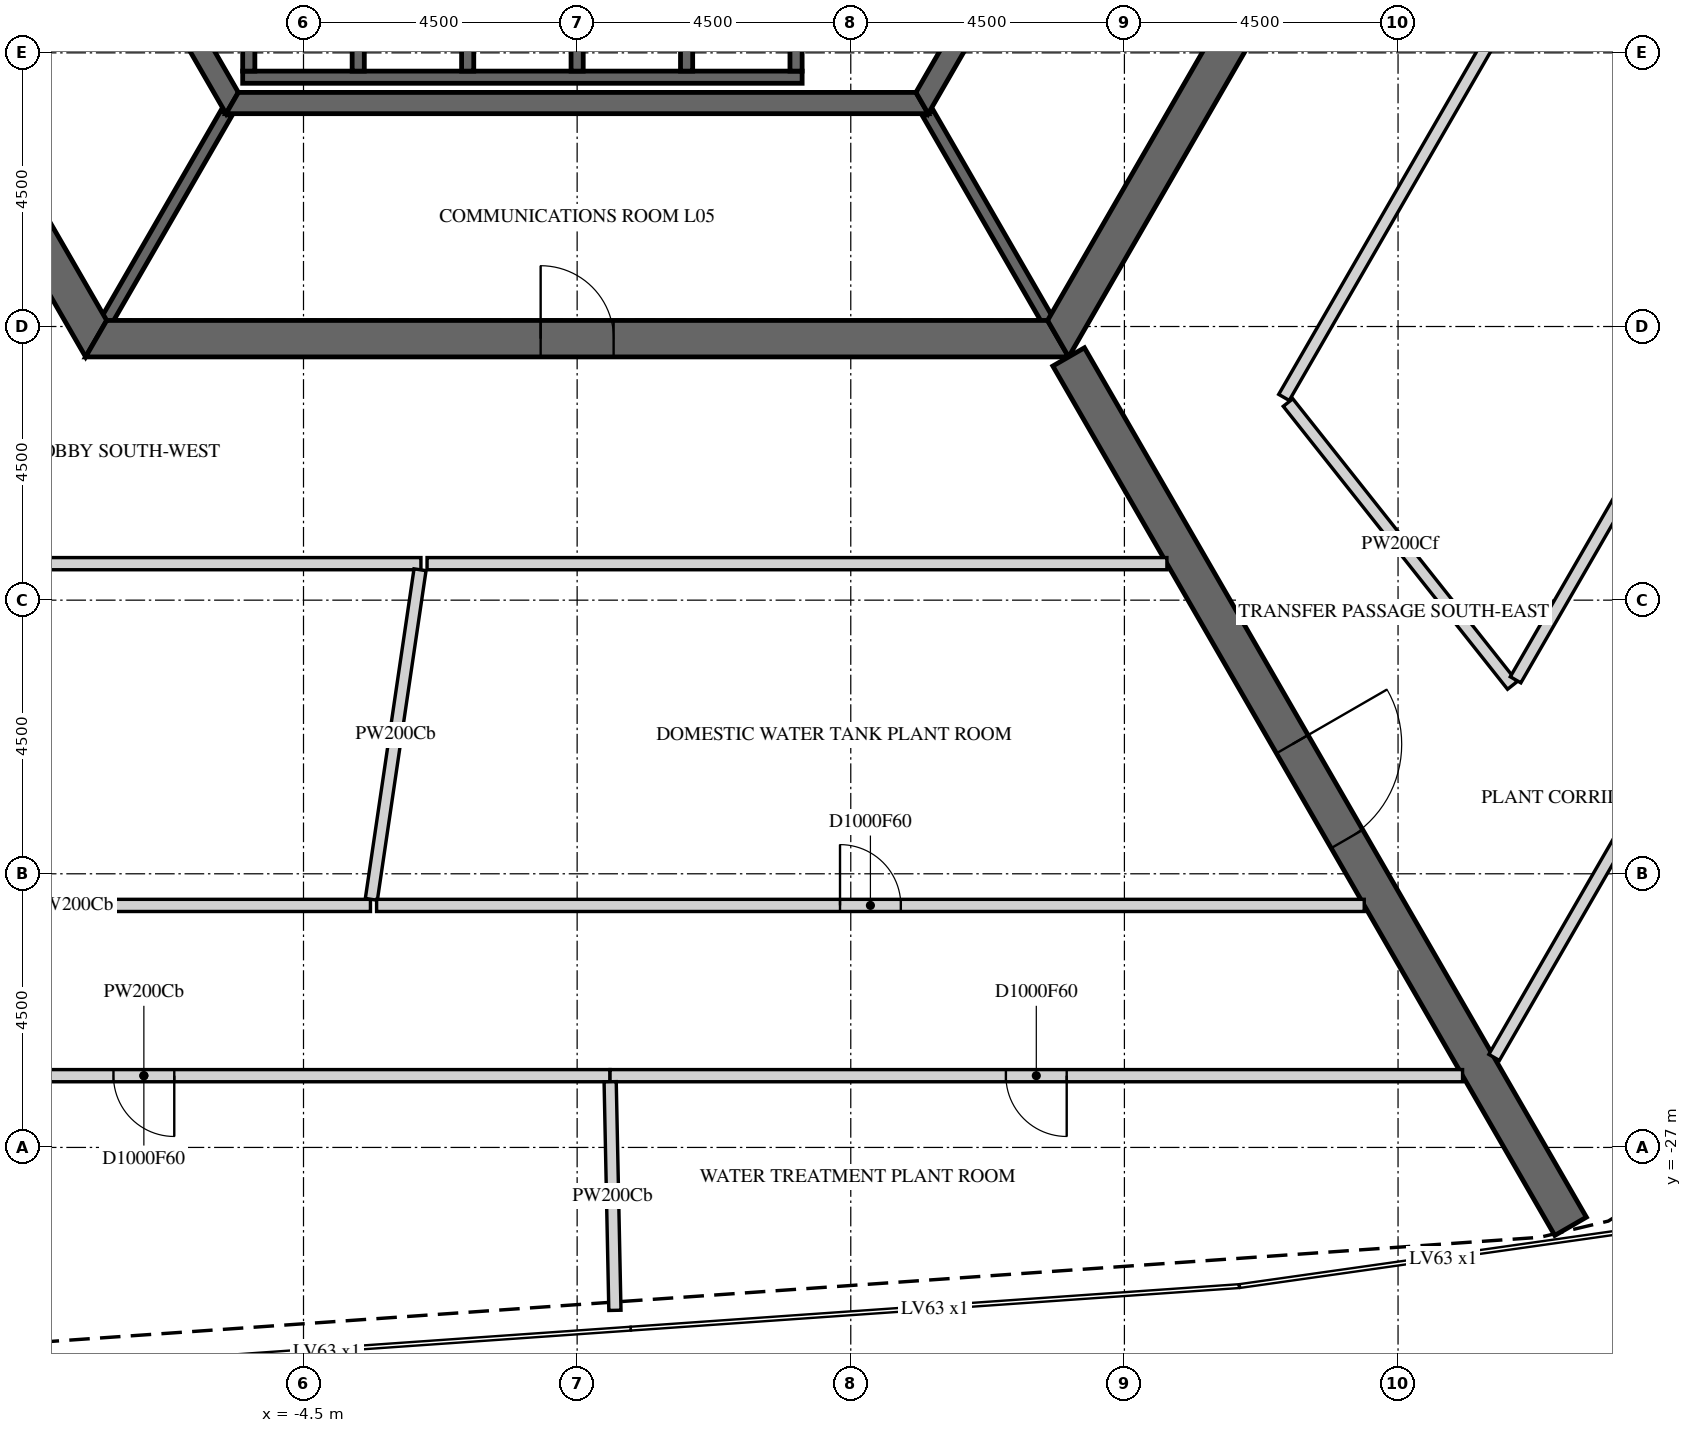
"""IFC4 building model, lengths in metres.
Left out: names, types, materials, properties, quantities, classifications, styles, units other than length and angle.
Written with IfcOpenShell. Run it as: python <this file> out.ifc"""

import sys

from ifc_helpers import new_model, si_unit, direction, frame, frame_2d, origin, place, context, subcontext, project, spatial, polyline, rectangle, outline, extrude, element, fill, save


model = new_model("IFC4")
c1 = context("Model", 3, precision=1e-05, world=origin(), true_north=direction((0.0, 1.0)))
c2 = subcontext(c1, "Body", "Model", "MODEL_VIEW")
j1 = project(units=[si_unit("LENGTHUNIT", "METRE"), si_unit("PLANEANGLEUNIT", "RADIAN")], contexts=[c1])
p1 = place(None, origin())
s1 = spatial("IfcSite", under=j1, at=p1, CompositionType="ELEMENT")
p2 = place(p1, origin())
s2 = spatial("IfcBuilding", under=s1, at=p2, CompositionType="ELEMENT")
p3 = place(p2, frame((0.0, 0.0, 31.5)))
s3 = spatial("IfcBuildingStorey", under=s2, at=p3, CompositionType="ELEMENT", Elevation=31.5)
p4 = place(p3, frame((-15.819, 0.0, -0.3), z_axis=(0.0, 0.0, 1.0), x_axis=(0.499999880136, -0.866025472988, 0.0)))
e1 = element("IfcWall", 1, at=p4, inside=s3, PredefinedType="SHEAR", context=c2, shape_type="SweptSolid", body=[
    extrude(outline(polyline([(-0.173, -0.3), (15.993, -0.3), (15.646, 0.3), (0.173, 0.3), (-0.173, -0.3)])), origin(), (0.0, 0.0, 1.0), 6.15),
])
p5 = place(p4, frame((6.981, 0.0, 0.3)))
e2 = element("IfcOpeningElement", 2, at=p5, cuts=e1, PredefinedType="OPENING", context=c2, shape_type="SweptSolid", body=[
    extrude(rectangle(XDim=1.8, YDim=2.4, at=frame_2d((0.9, 1.2))), frame((0.0, 0.31, 0.0), z_axis=(0.0, -1.0, 0.0), x_axis=(1.0, 0.0, 0.0)), (0.0, 0.0, 1.0), 0.62),
])
p6 = place(p3, frame((-7.91, -13.7, -0.3), z_axis=(0.0, 0.0, 1.0), x_axis=(1.0, 0.0, 0.0)))
e3 = element("IfcWall", 3, at=p6, inside=s3, PredefinedType="SHEAR", context=c2, shape_type="SweptSolid", body=[
    extrude(outline(polyline([(-0.173, -0.3), (15.993, -0.3), (15.646, 0.3), (0.173, 0.3), (-0.173, -0.3)])), origin(), (0.0, 0.0, 1.0), 6.15),
])
p7 = place(p6, frame((7.31, 0.0, 0.3)))
e4 = element("IfcOpeningElement", 4, at=p7, cuts=e3, PredefinedType="OPENING", context=c2, shape_type="SweptSolid", body=[
    extrude(rectangle(XDim=1.2, YDim=2.4, at=frame_2d((0.6, 1.2))), frame((0.0, 0.31, 0.0), z_axis=(0.0, -1.0, 0.0), x_axis=(1.0, 0.0, 0.0)), (0.0, 0.0, 1.0), 0.62),
])
p8 = place(p3, frame((7.91, -13.7, -0.3), z_axis=(0.0, 0.0, 1.0), x_axis=(0.499999880136, 0.866025472988, 0.0)))
e5 = element("IfcWall", 5, at=p8, inside=s3, PredefinedType="SHEAR", context=c2, shape_type="SweptSolid", body=[
    extrude(outline(polyline([(-0.173, -0.3), (15.993, -0.3), (15.646, 0.3), (0.173, 0.3), (-0.173, -0.3)])), origin(), (0.0, 0.0, 1.0), 6.15),
])
p9 = place(p8, frame((7.039, 0.0, 0.3)))
e6 = element("IfcOpeningElement", 6, at=p9, cuts=e5, PredefinedType="OPENING", context=c2, shape_type="SweptSolid", body=[
    extrude(rectangle(XDim=1.8, YDim=2.4, at=frame_2d((0.9, 1.2))), frame((0.0, 0.31, 0.0), z_axis=(0.0, -1.0, 0.0), x_axis=(1.0, 0.0, 0.0)), (0.0, 0.0, 1.0), 0.62),
])
p10 = place(p3, frame((8.083, -14.0, -0.3), z_axis=(0.0, 0.0, 1.0), x_axis=(0.499997680643, -0.866026742862, 0.0)))
e7 = element("IfcWall", 7, at=p10, inside=s3, PredefinedType="SHEAR", context=c2, shape_type="SweptSolid", body=[
    extrude(rectangle(XDim=16.509, YDim=0.6, at=frame_2d((8.254, 0.0))), origin(), (0.0, 0.0, 1.0), 6.15),
])
p11 = place(p10, frame((7.354, 0.0, 0.3)))
e8 = element("IfcOpeningElement", 8, at=p11, cuts=e7, PredefinedType="OPENING", context=c2, shape_type="SweptSolid", body=[
    extrude(rectangle(XDim=1.8, YDim=2.4, at=frame_2d((0.9, 1.2))), frame((0.0, 0.31, 0.0), z_axis=(0.0, -1.0, 0.0), x_axis=(1.0, 0.0, 0.0)), (0.0, 0.0, 1.0), 0.62),
])
p12 = place(p3, frame((-11.345, 0.0, -0.3), z_axis=(0.0, 0.0, 1.0), x_axis=(0.499995046907, -0.866028263435, 0.0)))
e9 = element("IfcWall", 9, at=p12, inside=s3, PredefinedType="SHEAR", context=c2, shape_type="SweptSolid", body=[
    extrude(outline(polyline([(-0.101, -0.175), (11.446, -0.175), (11.244, 0.175), (0.101, 0.175), (-0.101, -0.175)])), origin(), (0.0, 0.0, 1.0), 6.15),
])
p13 = place(p12, frame((4.744, 0.0, 0.3)))
e10 = element("IfcOpeningElement", 10, at=p13, cuts=e9, PredefinedType="OPENING", context=c2, shape_type="SweptSolid", body=[
    extrude(rectangle(XDim=1.8, YDim=2.4, at=frame_2d((0.9, 1.2))), frame((0.0, 0.185, 0.0), z_axis=(0.0, -1.0, 0.0), x_axis=(1.0, 0.0, 0.0)), (0.0, 0.0, 1.0), 0.37),
])
p14 = place(p3, frame((-5.673, -9.825, -0.3), z_axis=(0.0, 0.0, 1.0), x_axis=(1.0, 0.0, 0.0)))
e11 = element("IfcWall", 11, at=p14, inside=s3, PredefinedType="SHEAR", context=c2, shape_type="SweptSolid", body=[
    extrude(outline(polyline([(-0.101, -0.175), (11.446, -0.175), (11.244, 0.175), (0.101, 0.175), (-0.101, -0.175)])), origin(), (0.0, 0.0, 1.0), 6.15),
])
p15 = place(p3, frame((5.673, -9.825, -0.3), z_axis=(0.0, 0.0, 1.0), x_axis=(0.499995046907, 0.866028263435, 0.0)))
e12 = element("IfcWall", 12, at=p15, inside=s3, PredefinedType="SHEAR", context=c2, shape_type="SweptSolid", body=[
    extrude(outline(polyline([(-0.101, -0.175), (11.446, -0.175), (11.244, 0.175), (0.101, 0.175), (-0.101, -0.175)])), origin(), (0.0, 0.0, 1.0), 6.15),
])
p16 = place(p15, frame((4.801, 0.0, 0.3)))
e13 = element("IfcOpeningElement", 13, at=p16, cuts=e12, PredefinedType="OPENING", context=c2, shape_type="SweptSolid", body=[
    extrude(rectangle(XDim=1.8, YDim=2.4, at=frame_2d((0.9, 1.2))), frame((0.0, 0.185, 0.0), z_axis=(0.0, -1.0, 0.0), x_axis=(1.0, 0.0, 0.0)), (0.0, 0.0, 1.0), 0.37),
])
p17 = place(p3, frame((-5.5, -9.4, -0.25), z_axis=(0.0, 0.0, 1.0), x_axis=(1.0, 0.0, 0.0)))
e14 = element("IfcWall", 14, at=p17, inside=s3, PredefinedType="SHEAR", context=c2, shape_type="SweptSolid", body=[
    extrude(rectangle(XDim=9.2, YDim=0.2, at=frame_2d((4.6, 0.0))), origin(), (0.0, 0.0, 1.0), 6.0),
])
for number, where, z_axis, x_axis in (
    (15, (-5.4, -9.3, -0.25), (0.0, 0.0, 1.0), (0.0, 1.0, 0.0)),
    (16, (-3.6, -9.3, -0.25), (0.0, 0.0, 1.0), (0.0, 1.0, 0.0)),
    (17, (-1.8, -9.3, -0.25), (0.0, 0.0, 1.0), (0.0, 1.0, 0.0)),
    (18, (0.0, -9.3, -0.25), (0.0, 0.0, 1.0), (0.0, 1.0, 0.0)),
    (19, (1.8, -9.3, -0.25), (0.0, 0.0, 1.0), (0.0, 1.0, 0.0)),
    (20, (3.6, -9.3, -0.25), (0.0, 0.0, 1.0), (0.0, 1.0, 0.0)),
):
    element("IfcWall", number, at=place(p3, frame(where, z_axis=z_axis, x_axis=x_axis)), inside=s3, PredefinedType="SHEAR", context=c2, shape_type="SweptSolid", body=[
        extrude(rectangle(XDim=2.9, YDim=0.2, at=frame_2d((1.45, 0.0))), origin(), (0.0, 0.0, 1.0), 6.0),
    ])
for number, where, z_axis, x_axis in (
    (21, (-5.773, -10.0, -0.3), (0.0, 0.0, 1.0), (-0.5, -0.866, 0.0)),
    (22, (5.773, -10.0, -0.3), (0.0, 0.0, 1.0), (0.5, -0.866, 0.0)),
):
    element("IfcWall", number, at=place(p3, frame(where, z_axis=z_axis, x_axis=x_axis)), inside=s3, PredefinedType="SHEAR", context=c2, shape_type="SweptSolid", body=[
        extrude(rectangle(XDim=3.926, YDim=0.2, at=frame_2d((1.963, 0.0))), origin(), (0.0, 0.0, 1.0), 6.15),
    ])
p18 = place(p3, frame((0.541, -25.82, 0.0), z_axis=(0.0, 0.0, 1.0), x_axis=(-1.0, 0.0, 0.0)))
e23 = element("IfcWall", 23, at=p18, inside=s3, PredefinedType="PARTITIONING", context=c2, shape_type="SweptSolid", body=[
    extrude(rectangle(XDim=15.333, YDim=0.2, at=frame_2d((7.666, 0.0))), origin(), (0.0, 0.0, 1.0), 5.85),
])
p19 = place(p18, frame((7.166, 0.0, 0.0)))
e24 = element("IfcOpeningElement", 24, at=p19, cuts=e23, PredefinedType="OPENING", context=c2, shape_type="SweptSolid", body=[
    extrude(rectangle(XDim=1.0, YDim=2.1, at=frame_2d((0.5, 1.05))), frame((0.0, 0.11, 0.0), z_axis=(0.0, -1.0, 0.0), x_axis=(1.0, 0.0, 0.0)), (0.0, 0.0, 1.0), 0.22),
])
p20 = place(p3, frame((-9.93, -17.4, 0.0), z_axis=(0.0, 0.0, 1.0), x_axis=(1.0, 0.0, 0.0)))
e25 = element("IfcWall", 25, at=p20, inside=s3, PredefinedType="PARTITIONING", context=c2, shape_type="SweptSolid", body=[
    extrude(rectangle(XDim=7.361, YDim=0.2, at=frame_2d((3.681, 0.0))), origin(), (0.0, 0.0, 1.0), 5.85),
])
p21 = place(p3, frame((-3.399, -23.02, 0.0), z_axis=(0.0, 0.0, 1.0), x_axis=(-1.0, 0.0, 0.0)))
e26 = element("IfcWall", 26, at=p21, inside=s3, PredefinedType="PARTITIONING", context=c2, shape_type="SweptSolid", body=[
    extrude(rectangle(XDim=9.777, YDim=0.2, at=frame_2d((4.888, 0.0))), origin(), (0.0, 0.0, 1.0), 5.85),
])
p22 = place(p3, frame((-3.384, -22.92, 0.0), z_axis=(0.0, 0.0, 1.0), x_axis=(0.146117446513, 0.98926724995, 0.0)))
e27 = element("IfcWall", 27, at=p22, inside=s3, PredefinedType="PARTITIONING", context=c2, shape_type="SweptSolid", body=[
    extrude(rectangle(XDim=5.479, YDim=0.2, at=frame_2d((2.739, 0.0))), origin(), (0.0, 0.0, 1.0), 5.85),
])
p23 = place(p3, frame((-2.468, -17.4, 0.0), z_axis=(0.0, 0.0, 1.0), x_axis=(1.0, 0.0, 0.0)))
e28 = element("IfcWall", 28, at=p23, inside=s3, PredefinedType="PARTITIONING", context=c2, shape_type="SweptSolid", body=[
    extrude(rectangle(XDim=12.167, YDim=0.2, at=frame_2d((6.083, 0.0))), origin(), (0.0, 0.0, 1.0), 5.85),
])
p24 = place(p3, frame((14.561, -25.82, 0.0), z_axis=(0.0, 0.0, 1.0), x_axis=(-1.0, 0.0, 0.0)))
e29 = element("IfcWall", 29, at=p24, inside=s3, PredefinedType="PARTITIONING", context=c2, shape_type="SweptSolid", body=[
    extrude(rectangle(XDim=14.02, YDim=0.2, at=frame_2d((7.01, 0.0))), origin(), (0.0, 0.0, 1.0), 5.85),
])
p25 = place(p24, frame((6.51, 0.0, 0.0)))
e30 = element("IfcOpeningElement", 30, at=p25, cuts=e29, PredefinedType="OPENING", context=c2, shape_type="SweptSolid", body=[
    extrude(rectangle(XDim=1.0, YDim=2.1, at=frame_2d((0.5, 1.05))), frame((0.0, 0.11, 0.0), z_axis=(0.0, -1.0, 0.0), x_axis=(1.0, 0.0, 0.0)), (0.0, 0.0, 1.0), 0.22),
])
p26 = place(p3, frame((0.621, -29.679, 0.0), z_axis=(0.0, 0.0, 1.0), x_axis=(-0.020778782314, 0.999784097796, 0.0)))
e31 = element("IfcWall", 31, at=p26, inside=s3, PredefinedType="PARTITIONING", context=c2, shape_type="SweptSolid", body=[
    extrude(rectangle(XDim=3.76, YDim=0.2, at=frame_2d((1.88, 0.0))), origin(), (0.0, 0.0, 1.0), 5.85),
])
p27 = place(p3, frame((11.624, -14.666, 0.0), z_axis=(0.0, 0.0, 1.0), x_axis=(0.500026107117, 0.866010330309, 0.0)))
e32 = element("IfcWall", 32, at=p27, inside=s3, PredefinedType="PARTITIONING", context=c2, shape_type="SweptSolid", body=[
    extrude(rectangle(XDim=16.935, YDim=0.2, at=frame_2d((8.468, 0.0))), origin(), (0.0, 0.0, 1.0), 5.85),
])
p28 = place(p3, frame((-3.298, -23.02, 0.0), z_axis=(0.0, 0.0, 1.0), x_axis=(1.0, 0.0, 0.0)))
e33 = element("IfcWall", 33, at=p28, inside=s3, PredefinedType="PARTITIONING", context=c2, shape_type="SweptSolid", body=[
    extrude(rectangle(XDim=16.242, YDim=0.2, at=frame_2d((8.121, 0.0))), origin(), (0.0, 0.0, 1.0), 5.85),
])
p29 = place(p28, frame((7.621, 0.0, 0.0)))
e34 = element("IfcOpeningElement", 34, at=p29, cuts=e33, PredefinedType="OPENING", context=c2, shape_type="SweptSolid", body=[
    extrude(rectangle(XDim=1.0, YDim=2.1, at=frame_2d((0.5, 1.05))), frame((0.0, 0.11, 0.0), z_axis=(0.0, -1.0, 0.0), x_axis=(1.0, 0.0, 0.0)), (0.0, 0.0, 1.0), 0.22),
])
p30 = place(p3, frame((26.555, -5.645, 0.0), z_axis=(0.0, 0.0, 1.0), x_axis=(-0.500000552801, -0.866025084624, 0.0)))
e35 = element("IfcWall", 35, at=p30, inside=s3, PredefinedType="PARTITIONING", context=c2, shape_type="SweptSolid", body=[
    extrude(rectangle(XDim=22.95, YDim=0.2, at=frame_2d((11.475, 0.0))), origin(), (0.0, 0.0, 1.0), 5.85),
])
p31 = place(p30, frame((10.975, 0.0, 0.0)))
e36 = element("IfcOpeningElement", 36, at=p31, cuts=e35, PredefinedType="OPENING", context=c2, shape_type="SweptSolid", body=[
    extrude(rectangle(XDim=1.0, YDim=2.1, at=frame_2d((0.5, 1.05))), frame((0.0, 0.11, 0.0), z_axis=(0.0, -1.0, 0.0), x_axis=(1.0, 0.0, 0.0)), (0.0, 0.0, 1.0), 0.22),
])
p32 = place(p3, frame((15.379, -19.403, 0.0), z_axis=(0.0, 0.0, 1.0), x_axis=(-0.62116837149, 0.783677136492, 0.0)))
e37 = element("IfcWall", 37, at=p32, inside=s3, PredefinedType="PARTITIONING", context=c2, shape_type="SweptSolid", body=[
    extrude(rectangle(XDim=5.937, YDim=0.2, at=frame_2d((2.969, 0.0))), origin(), (0.0, 0.0, 1.0), 5.088),
])
p33 = place(p3, frame((15.433, -19.31, 0.0), z_axis=(0.0, 0.0, 1.0), x_axis=(0.499986369096, 0.866033273447, 0.0)))
e38 = element("IfcWall", 38, at=p33, inside=s3, PredefinedType="PARTITIONING", context=c2, shape_type="SweptSolid", body=[
    extrude(rectangle(XDim=22.181, YDim=0.2, at=frame_2d((11.091, 0.0))), origin(), (0.0, 0.0, 1.0), 5.85),
])
p34 = place(p33, frame((10.591, 0.0, 0.0)))
e39 = element("IfcOpeningElement", 39, at=p34, cuts=e38, PredefinedType="OPENING", context=c2, shape_type="SweptSolid", body=[
    extrude(rectangle(XDim=1.0, YDim=2.1, at=frame_2d((0.5, 1.05))), frame((0.0, 0.11, 0.0), z_axis=(0.0, -1.0, 0.0), x_axis=(1.0, 0.0, 0.0)), (0.0, 0.0, 1.0), 0.22),
])
p35 = place(p7, origin())
e40 = element("IfcDoor", 40, at=p35, inside=s3, OperationType="SINGLE_SWING_LEFT", PredefinedType="DOOR", context=c2, shape_type="SweptSolid", body=[
    extrude(rectangle(XDim=1.2, YDim=2.4, at=frame_2d((0.6, 1.2))), frame((0.0, 0.025, 0.0), z_axis=(0.0, -1.0, 0.0), x_axis=(1.0, 0.0, 0.0)), (0.0, 0.0, 1.0), 0.05),
])
fill(e4, e40)
p36 = place(p11, origin())
e41 = element("IfcDoor", 41, at=p36, inside=s3, OperationType="DOUBLE_DOOR_SINGLE_SWING", PredefinedType="DOOR", context=c2, shape_type="SweptSolid", body=[
    extrude(rectangle(XDim=1.8, YDim=2.4, at=frame_2d((0.9, 1.2))), frame((0.0, 0.025, 0.0), z_axis=(0.0, -1.0, 0.0), x_axis=(1.0, 0.0, 0.0)), (0.0, 0.0, 1.0), 0.05),
])
fill(e8, e41)
p37 = place(p19, origin())
e42 = element("IfcDoor", 42, at=p37, inside=s3, OperationType="SINGLE_SWING_LEFT", PredefinedType="DOOR", context=c2, shape_type="SweptSolid", body=[
    extrude(rectangle(XDim=1.0, YDim=2.1, at=frame_2d((0.5, 1.05))), frame((0.0, 0.025, 0.0), z_axis=(0.0, -1.0, 0.0), x_axis=(1.0, 0.0, 0.0)), (0.0, 0.0, 1.0), 0.05),
])
fill(e24, e42)
p38 = place(p25, origin())
e43 = element("IfcDoor", 43, at=p38, inside=s3, OperationType="SINGLE_SWING_LEFT", PredefinedType="DOOR", context=c2, shape_type="SweptSolid", body=[
    extrude(rectangle(XDim=1.0, YDim=2.1, at=frame_2d((0.5, 1.05))), frame((0.0, 0.025, 0.0), z_axis=(0.0, -1.0, 0.0), x_axis=(1.0, 0.0, 0.0)), (0.0, 0.0, 1.0), 0.05),
])
fill(e30, e43)
p39 = place(p29, origin())
e44 = element("IfcDoor", 44, at=p39, inside=s3, OperationType="SINGLE_SWING_LEFT", PredefinedType="DOOR", context=c2, shape_type="SweptSolid", body=[
    extrude(rectangle(XDim=1.0, YDim=2.1, at=frame_2d((0.5, 1.05))), frame((0.0, 0.025, 0.0), z_axis=(0.0, -1.0, 0.0), x_axis=(1.0, 0.0, 0.0)), (0.0, 0.0, 1.0), 0.05),
])
fill(e34, e44)
save(model, sys.argv[1])
